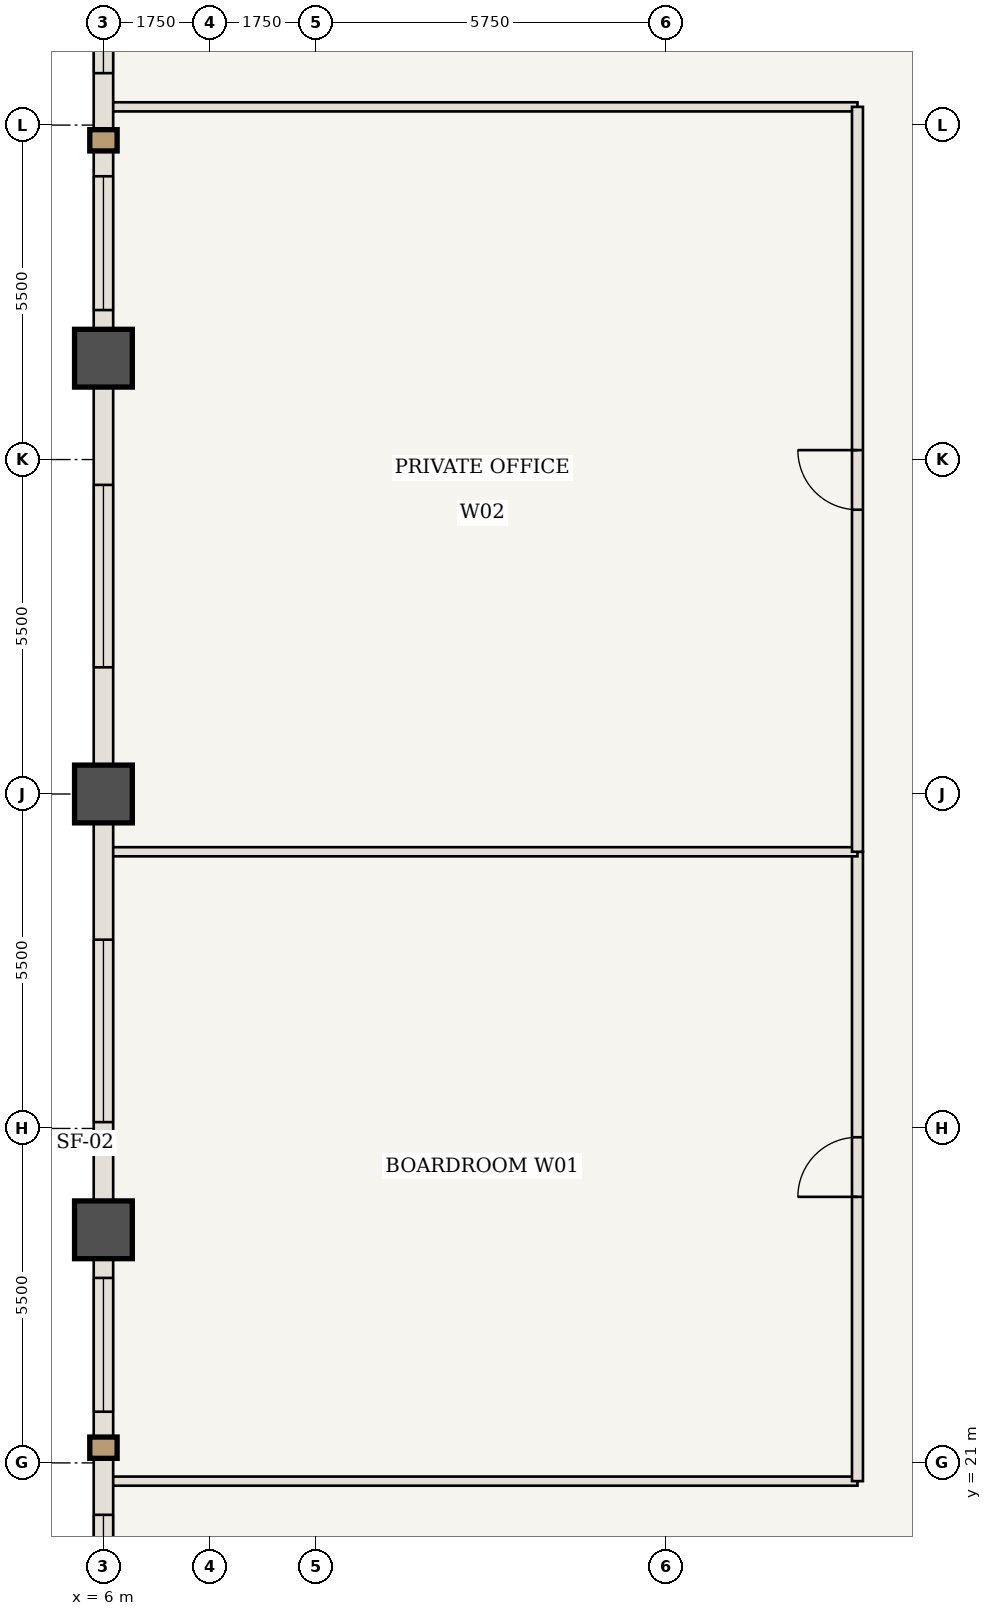
"""IFC4 building model, lengths in metres.
Left out: names, types, materials, properties, quantities, classifications, styles, units other than length and angle.
Written with IfcOpenShell. Run it as: python <this file> out.ifc"""

import sys

from ifc_helpers import new_model, si_unit, direction, frame, frame_2d, origin, origin_2d, place, context, subcontext, project, spatial, rectangle, extrude, element, fill, save


model = new_model("IFC4")
c1 = context("Model", 3, precision=1e-05, world=origin(), true_north=direction((0.0, 1.0)))
c2 = subcontext(c1, "Body", "Model", "MODEL_VIEW")
j1 = project(units=[si_unit("LENGTHUNIT", "METRE"), si_unit("PLANEANGLEUNIT", "RADIAN")], contexts=[c1])
p1 = place(None, origin())
s1 = spatial("IfcSite", under=j1, at=p1, CompositionType="ELEMENT")
p2 = place(p1, origin())
s2 = spatial("IfcBuilding", under=s1, at=p2, CompositionType="ELEMENT")
p3 = place(p2, frame((0.0, 0.0, 110.6)))
s3 = spatial("IfcBuildingStorey", under=s2, at=p3, CompositionType="ELEMENT", Elevation=110.6)
for number, where, z_axis, x_axis in (
    (1, (6.0, 24.833, 0.0), (0.0, 0.0, 1.0), (1.0, 0.0, 0.0)),
    (2, (6.0, 32.0, 0.0), (0.0, 0.0, 1.0), (1.0, 0.0, 0.0)),
    (3, (6.0, 39.167, 0.0), (0.0, 0.0, 1.0), (1.0, 0.0, 0.0)),
):
    element("IfcColumn", number, at=place(p3, frame(where, z_axis=z_axis, x_axis=x_axis)), inside=s3, PredefinedType="COLUMN", context=c2, shape_type="SweptSolid", body=[
        extrude(rectangle(XDim=0.95, YDim=0.95, at=origin_2d()), origin(), (0.0, 0.0, 1.0), 3.85),
    ])
for number, where, z_axis, x_axis in (
    (4, (6.06, 20.7, 0.0), (0.0, 0.0, 1.0), (1.0, 0.0, 0.0)),
    (5, (6.06, 43.3, 0.0), (0.0, 0.0, 1.0), (1.0, 0.0, 0.0)),
):
    element("IfcWall", number, at=place(p3, frame(where, z_axis=z_axis, x_axis=x_axis)), inside=s3, PredefinedType="STANDARD", context=c2, shape_type="SweptSolid", body=[
        extrude(rectangle(XDim=12.34, YDim=0.15, at=frame_2d((6.17, 0.0))), origin(), (0.0, 0.0, 1.0), 2.81),
    ])
p4 = place(p3, frame((18.4, 20.7, 0.0), z_axis=(0.0, 0.0, 1.0), x_axis=(0.0, 1.0, 0.0)))
e6 = element("IfcWall", 6, at=p4, inside=s3, PredefinedType="STANDARD", context=c2, shape_type="SweptSolid", body=[
    extrude(rectangle(XDim=10.35, YDim=0.18, at=frame_2d((5.175, 0.0))), origin(), (0.0, 0.0, 1.0), 3.43),
])
p5 = place(p4, frame((4.675, 0.0, 0.0)))
e7 = element("IfcOpeningElement", 7, at=p5, cuts=e6, PredefinedType="OPENING", context=c2, shape_type="SweptSolid", body=[
    extrude(rectangle(XDim=0.98, YDim=2.2, at=frame_2d((0.49, 1.1))), frame((0.0, 0.1, 0.0), z_axis=(0.0, -1.0, 0.0), x_axis=(1.0, 0.0, 0.0)), (0.0, 0.0, 1.0), 0.2),
])
p6 = place(p3, frame((6.06, 31.05, 0.0), z_axis=(0.0, 0.0, 1.0), x_axis=(1.0, 0.0, 0.0)))
e8 = element("IfcWall", 8, at=p6, inside=s3, PredefinedType="STANDARD", context=c2, shape_type="SweptSolid", body=[
    extrude(rectangle(XDim=12.34, YDim=0.15, at=frame_2d((6.17, 0.0))), origin(), (0.0, 0.0, 1.0), 3.43),
])
p7 = place(p3, frame((18.4, 31.05, 0.0), z_axis=(0.0, 0.0, 1.0), x_axis=(0.0, 1.0, 0.0)))
e9 = element("IfcWall", 9, at=p7, inside=s3, PredefinedType="STANDARD", context=c2, shape_type="SweptSolid", body=[
    extrude(rectangle(XDim=12.25, YDim=0.18, at=frame_2d((6.125, 0.0))), origin(), (0.0, 0.0, 1.0), 3.43),
])
p8 = place(p7, frame((5.625, 0.0, 0.0)))
e10 = element("IfcOpeningElement", 10, at=p8, cuts=e9, PredefinedType="OPENING", context=c2, shape_type="SweptSolid", body=[
    extrude(rectangle(XDim=0.98, YDim=2.2, at=frame_2d((0.49, 1.1))), frame((0.0, 0.1, 0.0), z_axis=(0.0, -1.0, 0.0), x_axis=(1.0, 0.0, 0.0)), (0.0, 0.0, 1.0), 0.2),
])
p9 = place(p3, frame((6.0, 17.667, 0.0), z_axis=(0.0, 0.0, 1.0), x_axis=(0.0, 1.0, 0.0)))
e11 = element("IfcWall", 11, at=p9, inside=s3, PredefinedType="USERDEFINED", context=c2, shape_type="SweptSolid", body=[
    extrude(rectangle(XDim=7.167, YDim=0.32, at=frame_2d((3.583, 0.0))), origin(), (0.0, 0.0, 1.0), 2.63),
])
p10 = place(p9, frame((0.879, 0.0, 0.85)))
e12 = element("IfcOpeningElement", 12, at=p10, cuts=e11, PredefinedType="OPENING", context=c2, shape_type="SweptSolid", body=[
    extrude(rectangle(XDim=1.6, YDim=1.58, at=frame_2d((0.8, 0.79))), frame((0.0, 0.17, 0.0), z_axis=(0.0, -1.0, 0.0), x_axis=(1.0, 0.0, 0.0)), (0.0, 0.0, 1.0), 0.34),
])
p11 = place(p9, frame((4.175, 0.0, 0.85)))
e13 = element("IfcOpeningElement", 13, at=p11, cuts=e11, PredefinedType="OPENING", context=c2, shape_type="SweptSolid", body=[
    extrude(rectangle(XDim=2.2, YDim=1.58, at=frame_2d((1.1, 0.79))), frame((0.0, 0.17, 0.0), z_axis=(0.0, -1.0, 0.0), x_axis=(1.0, 0.0, 0.0)), (0.0, 0.0, 1.0), 0.34),
])
p12 = place(p3, frame((6.0, 24.833, 0.0), z_axis=(0.0, 0.0, 1.0), x_axis=(0.0, 1.0, 0.0)))
e14 = element("IfcWall", 14, at=p12, inside=s3, PredefinedType="USERDEFINED", context=c2, shape_type="SweptSolid", body=[
    extrude(rectangle(XDim=7.167, YDim=0.32, at=frame_2d((3.583, 0.0))), origin(), (0.0, 0.0, 1.0), 2.63),
])
p13 = place(p12, frame((1.771, 0.0, 0.85)))
e15 = element("IfcOpeningElement", 15, at=p13, cuts=e14, PredefinedType="OPENING", context=c2, shape_type="SweptSolid", body=[
    extrude(rectangle(XDim=3.0, YDim=1.58, at=frame_2d((1.5, 0.79))), frame((0.0, 0.17, 0.0), z_axis=(0.0, -1.0, 0.0), x_axis=(1.0, 0.0, 0.0)), (0.0, 0.0, 1.0), 0.34),
])
p14 = place(p3, frame((6.0, 32.0, 0.0), z_axis=(0.0, 0.0, 1.0), x_axis=(0.0, 1.0, 0.0)))
e16 = element("IfcWall", 16, at=p14, inside=s3, PredefinedType="USERDEFINED", context=c2, shape_type="SweptSolid", body=[
    extrude(rectangle(XDim=7.167, YDim=0.32, at=frame_2d((3.583, 0.0))), origin(), (0.0, 0.0, 1.0), 2.63),
])
p15 = place(p14, frame((2.083, 0.0, 0.85)))
e17 = element("IfcOpeningElement", 17, at=p15, cuts=e16, PredefinedType="OPENING", context=c2, shape_type="SweptSolid", body=[
    extrude(rectangle(XDim=3.0, YDim=1.58, at=frame_2d((1.5, 0.79))), frame((0.0, 0.17, 0.0), z_axis=(0.0, -1.0, 0.0), x_axis=(1.0, 0.0, 0.0)), (0.0, 0.0, 1.0), 0.34),
])
p16 = place(p3, frame((6.0, 39.167, 0.0), z_axis=(0.0, 0.0, 1.0), x_axis=(0.0, 1.0, 0.0)))
e18 = element("IfcWall", 18, at=p16, inside=s3, PredefinedType="USERDEFINED", context=c2, shape_type="SweptSolid", body=[
    extrude(rectangle(XDim=7.167, YDim=0.32, at=frame_2d((3.583, 0.0))), origin(), (0.0, 0.0, 1.0), 2.63),
])
p17 = place(p16, frame((0.792, 0.0, 0.85)))
e19 = element("IfcOpeningElement", 19, at=p17, cuts=e18, PredefinedType="OPENING", context=c2, shape_type="SweptSolid", body=[
    extrude(rectangle(XDim=2.2, YDim=1.58, at=frame_2d((1.1, 0.79))), frame((0.0, 0.17, 0.0), z_axis=(0.0, -1.0, 0.0), x_axis=(1.0, 0.0, 0.0)), (0.0, 0.0, 1.0), 0.34),
])
p18 = place(p16, frame((4.688, 0.0, 0.85)))
e20 = element("IfcOpeningElement", 20, at=p18, cuts=e18, PredefinedType="OPENING", context=c2, shape_type="SweptSolid", body=[
    extrude(rectangle(XDim=1.6, YDim=1.58, at=frame_2d((0.8, 0.79))), frame((0.0, 0.17, 0.0), z_axis=(0.0, -1.0, 0.0), x_axis=(1.0, 0.0, 0.0)), (0.0, 0.0, 1.0), 0.34),
])
p19 = place(p5, origin())
e21 = element("IfcDoor", 21, at=p19, inside=s3, OperationType="SINGLE_SWING_LEFT", PredefinedType="DOOR", context=c2, shape_type="SweptSolid", body=[
    extrude(rectangle(XDim=0.98, YDim=2.2, at=frame_2d((0.49, 1.1))), frame((0.0, 0.025, 0.0), z_axis=(0.0, -1.0, 0.0), x_axis=(1.0, 0.0, 0.0)), (0.0, 0.0, 1.0), 0.05),
])
fill(e7, e21)
p20 = place(p8, origin())
e22 = element("IfcDoor", 22, at=p20, inside=s3, OperationType="SINGLE_SWING_RIGHT", PredefinedType="DOOR", context=c2, shape_type="SweptSolid", body=[
    extrude(rectangle(XDim=0.98, YDim=2.2, at=frame_2d((0.49, 1.1))), frame((0.0, 0.025, 0.0), z_axis=(0.0, -1.0, 0.0), x_axis=(1.0, 0.0, 0.0)), (0.0, 0.0, 1.0), 0.05),
])
fill(e10, e22)
p21 = place(p10, origin())
e23 = element("IfcWindow", 23, at=p21, inside=s3, PartitioningType="SINGLE_PANEL", PredefinedType="WINDOW", context=c2, shape_type="SweptSolid", body=[
    extrude(rectangle(XDim=1.6, YDim=1.58, at=frame_2d((0.8, 0.79))), frame((0.0, 0.03, 0.0), z_axis=(0.0, -1.0, 0.0), x_axis=(1.0, 0.0, 0.0)), (0.0, 0.0, 1.0), 0.06),
])
fill(e12, e23)
p22 = place(p11, origin())
e24 = element("IfcWindow", 24, at=p22, inside=s3, PartitioningType="SINGLE_PANEL", PredefinedType="WINDOW", context=c2, shape_type="SweptSolid", body=[
    extrude(rectangle(XDim=2.2, YDim=1.58, at=frame_2d((1.1, 0.79))), frame((0.0, 0.03, 0.0), z_axis=(0.0, -1.0, 0.0), x_axis=(1.0, 0.0, 0.0)), (0.0, 0.0, 1.0), 0.06),
])
fill(e13, e24)
p23 = place(p13, origin())
e25 = element("IfcWindow", 25, at=p23, inside=s3, PartitioningType="SINGLE_PANEL", PredefinedType="WINDOW", context=c2, shape_type="SweptSolid", body=[
    extrude(rectangle(XDim=3.0, YDim=1.58, at=frame_2d((1.5, 0.79))), frame((0.0, 0.03, 0.0), z_axis=(0.0, -1.0, 0.0), x_axis=(1.0, 0.0, 0.0)), (0.0, 0.0, 1.0), 0.06),
])
fill(e15, e25)
p24 = place(p15, origin())
e26 = element("IfcWindow", 26, at=p24, inside=s3, PartitioningType="SINGLE_PANEL", PredefinedType="WINDOW", context=c2, shape_type="SweptSolid", body=[
    extrude(rectangle(XDim=3.0, YDim=1.58, at=frame_2d((1.5, 0.79))), frame((0.0, 0.03, 0.0), z_axis=(0.0, -1.0, 0.0), x_axis=(1.0, 0.0, 0.0)), (0.0, 0.0, 1.0), 0.06),
])
fill(e17, e26)
p25 = place(p17, origin())
e27 = element("IfcWindow", 27, at=p25, inside=s3, PartitioningType="SINGLE_PANEL", PredefinedType="WINDOW", context=c2, shape_type="SweptSolid", body=[
    extrude(rectangle(XDim=2.2, YDim=1.58, at=frame_2d((1.1, 0.79))), frame((0.0, 0.03, 0.0), z_axis=(0.0, -1.0, 0.0), x_axis=(1.0, 0.0, 0.0)), (0.0, 0.0, 1.0), 0.06),
])
fill(e19, e27)
p26 = place(p18, origin())
e28 = element("IfcWindow", 28, at=p26, inside=s3, PartitioningType="SINGLE_PANEL", PredefinedType="WINDOW", context=c2, shape_type="SweptSolid", body=[
    extrude(rectangle(XDim=1.6, YDim=1.58, at=frame_2d((0.8, 0.79))), frame((0.0, 0.03, 0.0), z_axis=(0.0, -1.0, 0.0), x_axis=(1.0, 0.0, 0.0)), (0.0, 0.0, 1.0), 0.06),
])
fill(e20, e28)
save(model, sys.argv[1])
